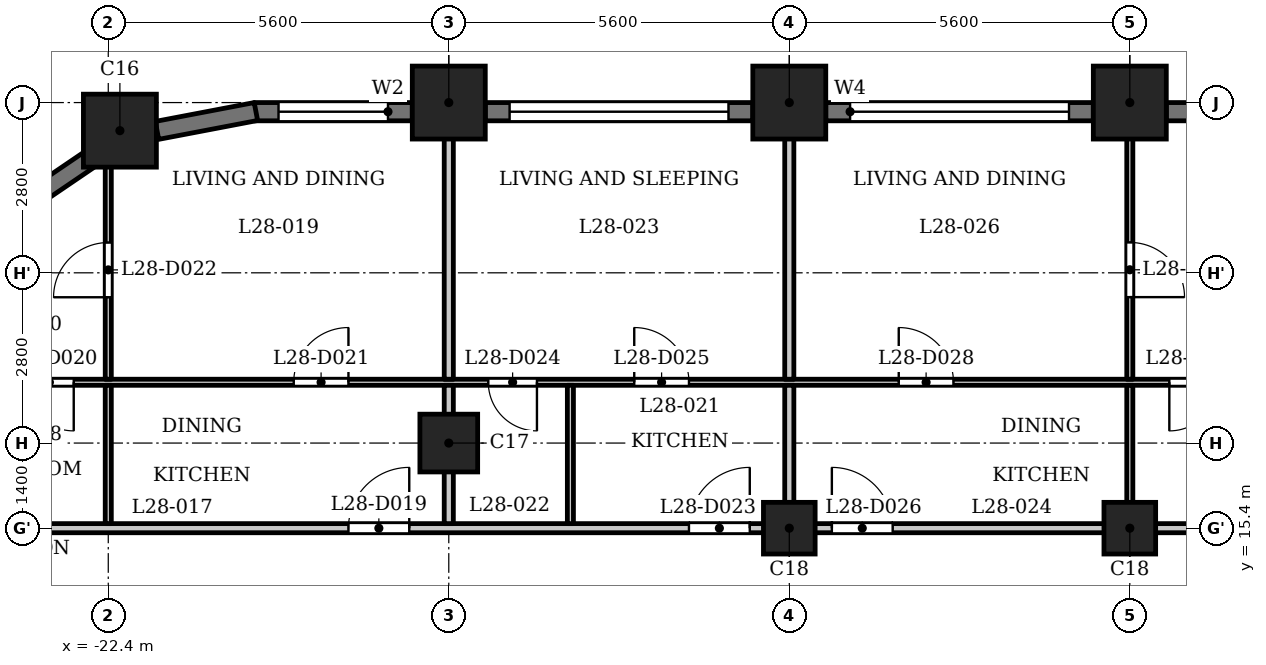
"""IFC4 building model, lengths in metres.
Left out: names, types, materials, properties, quantities, classifications, styles, units other than length and angle.
Written with IfcOpenShell. Run it as: python <this file> out.ifc"""

import sys

from ifc_helpers import new_model, si_unit, direction, frame, frame_2d, origin, origin_2d, place, context, subcontext, project, spatial, rectangle, extrude, element, fill, save


model = new_model("IFC4")
c1 = context("Model", 3, precision=1e-05, world=origin(), true_north=direction((0.0, 1.0)))
c2 = subcontext(c1, "Body", "Model", "MODEL_VIEW")
j1 = project(units=[si_unit("LENGTHUNIT", "METRE"), si_unit("PLANEANGLEUNIT", "RADIAN")], contexts=[c1])
p1 = place(None, origin())
s1 = spatial("IfcSite", under=j1, at=p1, CompositionType="ELEMENT")
p2 = place(p1, origin())
s2 = spatial("IfcBuilding", under=s1, at=p2, CompositionType="ELEMENT")
p3 = place(p2, frame((0.0, 0.0, 111.3)))
s3 = spatial("IfcBuildingStorey", under=s2, at=p3, CompositionType="ELEMENT", Elevation=111.3)
for number, where, z_axis, x_axis in (
    (1, (-5.6, 22.4, 0.0), (0.0, 0.0, 1.0), (1.0, 0.0, 0.0)),
    (2, (-11.2, 22.4, 0.0), (0.0, 0.0, 1.0), (1.0, 0.0, 0.0)),
    (3, (-16.8, 22.4, 0.0), (0.0, 0.0, 1.0), (1.0, 0.0, 0.0)),
    (4, (-22.209, 21.938, 0.0), (0.0, 0.0, 1.0), (1.0, 0.0, 0.0)),
):
    element("IfcColumn", number, at=place(p3, frame(where, z_axis=z_axis, x_axis=x_axis)), inside=s3, PredefinedType="COLUMN", context=c2, shape_type="SweptSolid", body=[
        extrude(rectangle(XDim=1.2, YDim=1.2, at=origin_2d()), origin(), (0.0, 0.0, 1.0), 3.5),
    ])
p4 = place(p3, frame((-16.8, 16.8, 0.0), z_axis=(0.0, 0.0, 1.0), x_axis=(1.0, 0.0, 0.0)))
e5 = element("IfcColumn", 5, at=p4, inside=s3, PredefinedType="COLUMN", context=c2, shape_type="SweptSolid", body=[
    extrude(rectangle(XDim=0.95, YDim=0.95, at=origin_2d()), origin(), (0.0, 0.0, 1.0), 3.5),
])
for number, where, z_axis, x_axis in (
    (6, (-11.2, 15.4, 0.0), (0.0, 0.0, 1.0), (1.0, 0.0, 0.0)),
    (7, (-5.6, 15.4, 0.0), (0.0, 0.0, 1.0), (1.0, 0.0, 0.0)),
):
    element("IfcColumn", number, at=place(p3, frame(where, z_axis=z_axis, x_axis=x_axis)), inside=s3, PredefinedType="COLUMN", context=c2, shape_type="SweptSolid", body=[
        extrude(rectangle(XDim=0.85, YDim=0.85, at=origin_2d()), origin(), (0.0, 0.0, 1.0), 3.5),
    ])
p5 = place(p3, frame((-0.6, 22.25, 0.0), z_axis=(0.0, 0.0, 1.0), x_axis=(-1.0, 0.0, 0.0)))
e8 = element("IfcWall", 8, at=p5, inside=s3, PredefinedType="SOLIDWALL", context=c2, shape_type="SweptSolid", body=[
    extrude(rectangle(XDim=4.4, YDim=0.3, at=frame_2d((2.2, 0.0))), origin(), (0.0, 0.0, 1.0), 2.4),
])
p6 = place(p5, frame((0.4, 0.0, 1.2)))
e9 = element("IfcOpeningElement", 9, at=p6, cuts=e8, PredefinedType="OPENING", context=c2, shape_type="SweptSolid", body=[
    extrude(rectangle(XDim=3.6, YDim=0.95, at=frame_2d((1.8, 0.475))), frame((0.0, 0.16, 0.0), z_axis=(0.0, -1.0, 0.0), x_axis=(1.0, 0.0, 0.0)), (0.0, 0.0, 1.0), 0.32),
])
p7 = place(p3, frame((-6.2, 22.25, 0.0), z_axis=(0.0, 0.0, 1.0), x_axis=(-1.0, 0.0, 0.0)))
e10 = element("IfcWall", 10, at=p7, inside=s3, PredefinedType="SOLIDWALL", context=c2, shape_type="SweptSolid", body=[
    extrude(rectangle(XDim=4.4, YDim=0.3, at=frame_2d((2.2, 0.0))), origin(), (0.0, 0.0, 1.0), 2.4),
])
p8 = place(p7, frame((0.4, 0.0, 1.2)))
e11 = element("IfcOpeningElement", 11, at=p8, cuts=e10, PredefinedType="OPENING", context=c2, shape_type="SweptSolid", body=[
    extrude(rectangle(XDim=3.6, YDim=0.95, at=frame_2d((1.8, 0.475))), frame((0.0, 0.16, 0.0), z_axis=(0.0, -1.0, 0.0), x_axis=(1.0, 0.0, 0.0)), (0.0, 0.0, 1.0), 0.32),
])
p9 = place(p3, frame((-11.8, 22.25, 0.0), z_axis=(0.0, 0.0, 1.0), x_axis=(-1.0, 0.0, 0.0)))
e12 = element("IfcWall", 12, at=p9, inside=s3, PredefinedType="SOLIDWALL", context=c2, shape_type="SweptSolid", body=[
    extrude(rectangle(XDim=4.4, YDim=0.3, at=frame_2d((2.2, 0.0))), origin(), (0.0, 0.0, 1.0), 2.4),
])
p10 = place(p9, frame((0.4, 0.0, 1.2)))
e13 = element("IfcOpeningElement", 13, at=p10, cuts=e12, PredefinedType="OPENING", context=c2, shape_type="SweptSolid", body=[
    extrude(rectangle(XDim=3.6, YDim=0.95, at=frame_2d((1.8, 0.475))), frame((0.0, 0.16, 0.0), z_axis=(0.0, -1.0, 0.0), x_axis=(1.0, 0.0, 0.0)), (0.0, 0.0, 1.0), 0.32),
])
p11 = place(p3, frame((-17.4, 22.25, 0.0), z_axis=(0.0, 0.0, 1.0), x_axis=(-1.0, 0.0, 0.0)))
e14 = element("IfcWall", 14, at=p11, inside=s3, PredefinedType="SOLIDWALL", context=c2, shape_type="SweptSolid", body=[
    extrude(rectangle(XDim=2.6, YDim=0.3, at=frame_2d((1.3, 0.0))), origin(), (0.0, 0.0, 1.0), 2.4),
])
p12 = place(p11, frame((0.4, 0.0, 0.9)))
e15 = element("IfcOpeningElement", 15, at=p12, cuts=e14, PredefinedType="OPENING", context=c2, shape_type="SweptSolid", body=[
    extrude(rectangle(XDim=1.8, YDim=1.25, at=frame_2d((0.9, 0.625))), frame((0.0, 0.16, 0.0), z_axis=(0.0, -1.0, 0.0), x_axis=(1.0, 0.0, 0.0)), (0.0, 0.0, 1.0), 0.32),
])
for number, where, z_axis, x_axis in (
    (16, (-19.972, 22.253, 0.0), (0.0, 0.0, 1.0), (-0.982, -0.187, 0.0)),
    (17, (-22.643, 21.51, 0.0), (0.0, 0.0, 1.0), (-0.827, -0.562, 0.0)),
):
    element("IfcWall", number, at=place(p3, frame(where, z_axis=z_axis, x_axis=x_axis)), inside=s3, PredefinedType="SOLIDWALL", context=c2, shape_type="SweptSolid", body=[
        extrude(rectangle(XDim=1.656, YDim=0.3, at=frame_2d((0.828, 0.0))), origin(), (0.0, 0.0, 1.0), 2.4),
    ])
p13 = place(p3, frame((-27.484, 15.4, 0.0), z_axis=(0.0, 0.0, 1.0), x_axis=(1.0, 0.0, 0.0)))
e18 = element("IfcWall", 18, at=p13, inside=s3, PredefinedType="PARTITIONING", context=c2, shape_type="SweptSolid", body=[
    extrude(rectangle(XDim=54.968, YDim=0.15, at=frame_2d((27.484, 0.0))), origin(), (0.0, 0.0, 1.0), 3.2),
])
p14 = place(p13, frame((9.034, 0.0, 0.0)))
e19 = element("IfcOpeningElement", 19, at=p14, cuts=e18, PredefinedType="OPENING", context=c2, shape_type="SweptSolid", body=[
    extrude(rectangle(XDim=1.0, YDim=2.1, at=frame_2d((0.5, 1.05))), frame((0.0, 0.085, 0.0), z_axis=(0.0, -1.0, 0.0), x_axis=(1.0, 0.0, 0.0)), (0.0, 0.0, 1.0), 0.17),
])
p15 = place(p13, frame((14.634, 0.0, 0.0)))
e20 = element("IfcOpeningElement", 20, at=p15, cuts=e18, PredefinedType="OPENING", context=c2, shape_type="SweptSolid", body=[
    extrude(rectangle(XDim=1.0, YDim=2.1, at=frame_2d((0.5, 1.05))), frame((0.0, 0.085, 0.0), z_axis=(0.0, -1.0, 0.0), x_axis=(1.0, 0.0, 0.0)), (0.0, 0.0, 1.0), 0.17),
])
p16 = place(p13, frame((16.984, 0.0, 0.0)))
e21 = element("IfcOpeningElement", 21, at=p16, cuts=e18, PredefinedType="OPENING", context=c2, shape_type="SweptSolid", body=[
    extrude(rectangle(XDim=1.0, YDim=2.1, at=frame_2d((0.5, 1.05))), frame((0.0, 0.085, 0.0), z_axis=(0.0, -1.0, 0.0), x_axis=(1.0, 0.0, 0.0)), (0.0, 0.0, 1.0), 0.17),
])
p17 = place(p13, frame((28.084, 0.0, 0.0)))
e22 = element("IfcOpeningElement", 22, at=p17, cuts=e18, PredefinedType="OPENING", context=c2, shape_type="SweptSolid", body=[
    extrude(rectangle(XDim=1.0, YDim=2.1, at=frame_2d((0.5, 1.05))), frame((0.0, 0.085, 0.0), z_axis=(0.0, -1.0, 0.0), x_axis=(1.0, 0.0, 0.0)), (0.0, 0.0, 1.0), 0.17),
])
p18 = place(p13, frame((34.834, 0.0, 0.0)))
e23 = element("IfcOpeningElement", 23, at=p18, cuts=e18, PredefinedType="OPENING", context=c2, shape_type="SweptSolid", body=[
    extrude(rectangle(XDim=1.0, YDim=2.1, at=frame_2d((0.5, 1.05))), frame((0.0, 0.085, 0.0), z_axis=(0.0, -1.0, 0.0), x_axis=(1.0, 0.0, 0.0)), (0.0, 0.0, 1.0), 0.17),
])
p19 = place(p13, frame((41.884, 0.0, 0.0)))
e24 = element("IfcOpeningElement", 24, at=p19, cuts=e18, PredefinedType="OPENING", context=c2, shape_type="SweptSolid", body=[
    extrude(rectangle(XDim=1.0, YDim=2.1, at=frame_2d((0.5, 1.05))), frame((0.0, 0.085, 0.0), z_axis=(0.0, -1.0, 0.0), x_axis=(1.0, 0.0, 0.0)), (0.0, 0.0, 1.0), 0.17),
])
p20 = place(p13, frame((48.234, 0.0, 0.0)))
e25 = element("IfcOpeningElement", 25, at=p20, cuts=e18, PredefinedType="OPENING", context=c2, shape_type="SweptSolid", body=[
    extrude(rectangle(XDim=1.0, YDim=2.1, at=frame_2d((0.5, 1.05))), frame((0.0, 0.085, 0.0), z_axis=(0.0, -1.0, 0.0), x_axis=(1.0, 0.0, 0.0)), (0.0, 0.0, 1.0), 0.17),
])
p21 = place(p3, frame((-26.465, 17.8, 0.0), z_axis=(0.0, 0.0, 1.0), x_axis=(1.0, 0.0, 0.0)))
e26 = element("IfcWall", 26, at=p21, inside=s3, PredefinedType="PARTITIONING", context=c2, shape_type="SweptSolid", body=[
    extrude(rectangle(XDim=52.859, YDim=0.1, at=frame_2d((26.43, 0.0))), origin(), (0.0, 0.0, 1.0), 3.2),
])
p22 = place(p21, frame((2.697, 0.0, 0.0)))
e27 = element("IfcOpeningElement", 27, at=p22, cuts=e26, PredefinedType="OPENING", context=c2, shape_type="SweptSolid", body=[
    extrude(rectangle(XDim=0.8, YDim=2.1, at=frame_2d((0.4, 1.05))), frame((0.0, 0.06, 0.0), z_axis=(0.0, -1.0, 0.0), x_axis=(1.0, 0.0, 0.0)), (0.0, 0.0, 1.0), 0.12),
])
p23 = place(p21, frame((7.115, 0.0, 0.0)))
e28 = element("IfcOpeningElement", 28, at=p23, cuts=e26, PredefinedType="OPENING", context=c2, shape_type="SweptSolid", body=[
    extrude(rectangle(XDim=0.9, YDim=2.1, at=frame_2d((0.45, 1.05))), frame((0.0, 0.06, 0.0), z_axis=(0.0, -1.0, 0.0), x_axis=(1.0, 0.0, 0.0)), (0.0, 0.0, 1.0), 0.12),
])
p24 = place(p21, frame((10.315, 0.0, 0.0)))
e29 = element("IfcOpeningElement", 29, at=p24, cuts=e26, PredefinedType="OPENING", context=c2, shape_type="SweptSolid", body=[
    extrude(rectangle(XDim=0.8, YDim=2.1, at=frame_2d((0.4, 1.05))), frame((0.0, 0.06, 0.0), z_axis=(0.0, -1.0, 0.0), x_axis=(1.0, 0.0, 0.0)), (0.0, 0.0, 1.0), 0.12),
])
p25 = place(p21, frame((12.715, 0.0, 0.0)))
e30 = element("IfcOpeningElement", 30, at=p25, cuts=e26, PredefinedType="OPENING", context=c2, shape_type="SweptSolid", body=[
    extrude(rectangle(XDim=0.9, YDim=2.1, at=frame_2d((0.45, 1.05))), frame((0.0, 0.06, 0.0), z_axis=(0.0, -1.0, 0.0), x_axis=(1.0, 0.0, 0.0)), (0.0, 0.0, 1.0), 0.12),
])
p26 = place(p21, frame((21.515, 0.0, 0.0)))
e31 = element("IfcOpeningElement", 31, at=p26, cuts=e26, PredefinedType="OPENING", context=c2, shape_type="SweptSolid", body=[
    extrude(rectangle(XDim=0.8, YDim=2.1, at=frame_2d((0.4, 1.05))), frame((0.0, 0.06, 0.0), z_axis=(0.0, -1.0, 0.0), x_axis=(1.0, 0.0, 0.0)), (0.0, 0.0, 1.0), 0.12),
])
p27 = place(p21, frame((17.065, 0.0, 0.0)))
e32 = element("IfcOpeningElement", 32, at=p27, cuts=e26, PredefinedType="OPENING", context=c2, shape_type="SweptSolid", body=[
    extrude(rectangle(XDim=0.9, YDim=2.1, at=frame_2d((0.45, 1.05))), frame((0.0, 0.06, 0.0), z_axis=(0.0, -1.0, 0.0), x_axis=(1.0, 0.0, 0.0)), (0.0, 0.0, 1.0), 0.12),
])
p28 = place(p21, frame((30.365, 0.0, 0.0)))
e33 = element("IfcOpeningElement", 33, at=p28, cuts=e26, PredefinedType="OPENING", context=c2, shape_type="SweptSolid", body=[
    extrude(rectangle(XDim=0.8, YDim=2.1, at=frame_2d((0.4, 1.05))), frame((0.0, 0.06, 0.0), z_axis=(0.0, -1.0, 0.0), x_axis=(1.0, 0.0, 0.0)), (0.0, 0.0, 1.0), 0.12),
])
p29 = place(p21, frame((28.165, 0.0, 0.0)))
e34 = element("IfcOpeningElement", 34, at=p29, cuts=e26, PredefinedType="OPENING", context=c2, shape_type="SweptSolid", body=[
    extrude(rectangle(XDim=0.9, YDim=2.1, at=frame_2d((0.45, 1.05))), frame((0.0, 0.06, 0.0), z_axis=(0.0, -1.0, 0.0), x_axis=(1.0, 0.0, 0.0)), (0.0, 0.0, 1.0), 0.12),
])
p30 = place(p21, frame((36.115, 0.0, 0.0)))
e35 = element("IfcOpeningElement", 35, at=p30, cuts=e26, PredefinedType="OPENING", context=c2, shape_type="SweptSolid", body=[
    extrude(rectangle(XDim=0.8, YDim=2.1, at=frame_2d((0.4, 1.05))), frame((0.0, 0.06, 0.0), z_axis=(0.0, -1.0, 0.0), x_axis=(1.0, 0.0, 0.0)), (0.0, 0.0, 1.0), 0.12),
])
p31 = place(p21, frame((32.915, 0.0, 0.0)))
e36 = element("IfcOpeningElement", 36, at=p31, cuts=e26, PredefinedType="OPENING", context=c2, shape_type="SweptSolid", body=[
    extrude(rectangle(XDim=0.9, YDim=2.1, at=frame_2d((0.45, 1.05))), frame((0.0, 0.06, 0.0), z_axis=(0.0, -1.0, 0.0), x_axis=(1.0, 0.0, 0.0)), (0.0, 0.0, 1.0), 0.12),
])
p32 = place(p21, frame((38.315, 0.0, 0.0)))
e37 = element("IfcOpeningElement", 37, at=p32, cuts=e26, PredefinedType="OPENING", context=c2, shape_type="SweptSolid", body=[
    extrude(rectangle(XDim=0.8, YDim=2.1, at=frame_2d((0.4, 1.05))), frame((0.0, 0.06, 0.0), z_axis=(0.0, -1.0, 0.0), x_axis=(1.0, 0.0, 0.0)), (0.0, 0.0, 1.0), 0.12),
])
p33 = place(p21, frame((40.965, 0.0, 0.0)))
e38 = element("IfcOpeningElement", 38, at=p33, cuts=e26, PredefinedType="OPENING", context=c2, shape_type="SweptSolid", body=[
    extrude(rectangle(XDim=0.9, YDim=2.1, at=frame_2d((0.45, 1.05))), frame((0.0, 0.06, 0.0), z_axis=(0.0, -1.0, 0.0), x_axis=(1.0, 0.0, 0.0)), (0.0, 0.0, 1.0), 0.12),
])
p34 = place(p21, frame((51.265, 0.0, 0.0)))
e39 = element("IfcOpeningElement", 39, at=p34, cuts=e26, PredefinedType="OPENING", context=c2, shape_type="SweptSolid", body=[
    extrude(rectangle(XDim=0.8, YDim=2.1, at=frame_2d((0.4, 1.05))), frame((0.0, 0.06, 0.0), z_axis=(0.0, -1.0, 0.0), x_axis=(1.0, 0.0, 0.0)), (0.0, 0.0, 1.0), 0.12),
])
p35 = place(p21, frame((46.315, 0.0, 0.0)))
e40 = element("IfcOpeningElement", 40, at=p35, cuts=e26, PredefinedType="OPENING", context=c2, shape_type="SweptSolid", body=[
    extrude(rectangle(XDim=0.9, YDim=2.1, at=frame_2d((0.45, 1.05))), frame((0.0, 0.06, 0.0), z_axis=(0.0, -1.0, 0.0), x_axis=(1.0, 0.0, 0.0)), (0.0, 0.0, 1.0), 0.12),
])
p36 = place(p3, frame((-22.4, 15.475, 0.0), z_axis=(0.0, 0.0, 1.0), x_axis=(0.0, 1.0, 0.0)))
e41 = element("IfcWall", 41, at=p36, inside=s3, PredefinedType="PARTITIONING", context=c2, shape_type="SweptSolid", body=[
    extrude(rectangle(XDim=2.275, YDim=0.1, at=frame_2d((1.137, 0.0))), origin(), (0.0, 0.0, 1.0), 3.2),
])
p37 = place(p3, frame((-22.4, 17.85, 0.0), z_axis=(0.0, 0.0, 1.0), x_axis=(0.0, 1.0, 0.0)))
e42 = element("IfcWall", 42, at=p37, inside=s3, PredefinedType="PARTITIONING", context=c2, shape_type="SweptSolid", body=[
    extrude(rectangle(XDim=3.87, YDim=0.1, at=frame_2d((1.935, 0.0))), origin(), (0.0, 0.0, 1.0), 3.2),
])
p38 = place(p37, frame((1.348, 0.0, 0.0)))
e43 = element("IfcOpeningElement", 43, at=p38, cuts=e42, PredefinedType="OPENING", context=c2, shape_type="SweptSolid", body=[
    extrude(rectangle(XDim=0.9, YDim=2.1, at=frame_2d((0.45, 1.05))), frame((0.0, 0.06, 0.0), z_axis=(0.0, -1.0, 0.0), x_axis=(1.0, 0.0, 0.0)), (0.0, 0.0, 1.0), 0.12),
])
p39 = place(p3, frame((-16.8, 15.475, 0.0), z_axis=(0.0, 0.0, 1.0), x_axis=(0.0, 1.0, 0.0)))
e44 = element("IfcWall", 44, at=p39, inside=s3, PredefinedType="PARTITIONING", context=c2, shape_type="SweptSolid", body=[
    extrude(rectangle(XDim=2.275, YDim=0.15, at=frame_2d((1.137, 0.0))), origin(), (0.0, 0.0, 1.0), 3.2),
])
p40 = place(p3, frame((-16.8, 17.85, 0.0), z_axis=(0.0, 0.0, 1.0), x_axis=(0.0, 1.0, 0.0)))
e45 = element("IfcWall", 45, at=p40, inside=s3, PredefinedType="PARTITIONING", context=c2, shape_type="SweptSolid", body=[
    extrude(rectangle(XDim=5.13, YDim=0.15, at=frame_2d((2.565, 0.0))), origin(), (0.0, 0.0, 1.0), 3.2),
])
p41 = place(p3, frame((-14.8, 15.475, 0.0), z_axis=(0.0, 0.0, 1.0), x_axis=(0.0, 1.0, 0.0)))
e46 = element("IfcWall", 46, at=p41, inside=s3, PredefinedType="PARTITIONING", context=c2, shape_type="SweptSolid", body=[
    extrude(rectangle(XDim=2.275, YDim=0.1, at=frame_2d((1.137, 0.0))), origin(), (0.0, 0.0, 1.0), 3.2),
])
p42 = place(p3, frame((-11.2, 15.475, 0.0), z_axis=(0.0, 0.0, 1.0), x_axis=(0.0, 1.0, 0.0)))
e47 = element("IfcWall", 47, at=p42, inside=s3, PredefinedType="PARTITIONING", context=c2, shape_type="SweptSolid", body=[
    extrude(rectangle(XDim=2.275, YDim=0.15, at=frame_2d((1.137, 0.0))), origin(), (0.0, 0.0, 1.0), 3.2),
])
p43 = place(p3, frame((-11.2, 17.85, 0.0), z_axis=(0.0, 0.0, 1.0), x_axis=(0.0, 1.0, 0.0)))
e48 = element("IfcWall", 48, at=p43, inside=s3, PredefinedType="PARTITIONING", context=c2, shape_type="SweptSolid", body=[
    extrude(rectangle(XDim=5.13, YDim=0.15, at=frame_2d((2.565, 0.0))), origin(), (0.0, 0.0, 1.0), 3.2),
])
p44 = place(p3, frame((-5.6, 15.475, 0.0), z_axis=(0.0, 0.0, 1.0), x_axis=(0.0, 1.0, 0.0)))
e49 = element("IfcWall", 49, at=p44, inside=s3, PredefinedType="PARTITIONING", context=c2, shape_type="SweptSolid", body=[
    extrude(rectangle(XDim=2.275, YDim=0.1, at=frame_2d((1.137, 0.0))), origin(), (0.0, 0.0, 1.0), 3.2),
])
p45 = place(p3, frame((-5.6, 17.85, 0.0), z_axis=(0.0, 0.0, 1.0), x_axis=(0.0, 1.0, 0.0)))
e50 = element("IfcWall", 50, at=p45, inside=s3, PredefinedType="PARTITIONING", context=c2, shape_type="SweptSolid", body=[
    extrude(rectangle(XDim=5.13, YDim=0.1, at=frame_2d((2.565, 0.0))), origin(), (0.0, 0.0, 1.0), 3.2),
])
p46 = place(p45, frame((1.35, 0.0, 0.0)))
e51 = element("IfcOpeningElement", 51, at=p46, cuts=e50, PredefinedType="OPENING", context=c2, shape_type="SweptSolid", body=[
    extrude(rectangle(XDim=0.9, YDim=2.1, at=frame_2d((0.45, 1.05))), frame((0.0, 0.06, 0.0), z_axis=(0.0, -1.0, 0.0), x_axis=(1.0, 0.0, 0.0)), (0.0, 0.0, 1.0), 0.12),
])
p47 = place(p14, origin())
e52 = element("IfcDoor", 52, at=p47, inside=s3, OperationType="SINGLE_SWING_LEFT", PredefinedType="DOOR", context=c2, shape_type="SweptSolid", body=[
    extrude(rectangle(XDim=1.0, YDim=2.1, at=frame_2d((0.5, 1.05))), frame((0.0, 0.025, 0.0), z_axis=(0.0, -1.0, 0.0), x_axis=(1.0, 0.0, 0.0)), (0.0, 0.0, 1.0), 0.05),
])
fill(e19, e52)
p48 = place(p22, origin())
e53 = element("IfcDoor", 53, at=p48, inside=s3, OperationType="SINGLE_SWING_RIGHT", PredefinedType="DOOR", context=c2, shape_type="SweptSolid", body=[
    extrude(rectangle(XDim=0.8, YDim=2.1, at=frame_2d((0.4, 1.05))), frame((0.0, 0.025, 0.0), z_axis=(0.0, -1.0, 0.0), x_axis=(1.0, 0.0, 0.0)), (0.0, 0.0, 1.0), 0.05),
])
fill(e27, e53)
p49 = place(p23, origin())
e54 = element("IfcDoor", 54, at=p49, inside=s3, OperationType="SINGLE_SWING_LEFT", PredefinedType="DOOR", context=c2, shape_type="SweptSolid", body=[
    extrude(rectangle(XDim=0.9, YDim=2.1, at=frame_2d((0.45, 1.05))), frame((0.0, 0.025, 0.0), z_axis=(0.0, -1.0, 0.0), x_axis=(1.0, 0.0, 0.0)), (0.0, 0.0, 1.0), 0.05),
])
fill(e28, e54)
p50 = place(p38, origin())
e55 = element("IfcDoor", 55, at=p50, inside=s3, OperationType="SINGLE_SWING_RIGHT", PredefinedType="DOOR", context=c2, shape_type="SweptSolid", body=[
    extrude(rectangle(XDim=0.9, YDim=2.1, at=frame_2d((0.45, 1.05))), frame((0.0, 0.025, 0.0), z_axis=(0.0, -1.0, 0.0), x_axis=(1.0, 0.0, 0.0)), (0.0, 0.0, 1.0), 0.05),
])
fill(e43, e55)
p51 = place(p15, origin())
e56 = element("IfcDoor", 56, at=p51, inside=s3, OperationType="SINGLE_SWING_LEFT", PredefinedType="DOOR", context=c2, shape_type="SweptSolid", body=[
    extrude(rectangle(XDim=1.0, YDim=2.1, at=frame_2d((0.5, 1.05))), frame((0.0, 0.025, 0.0), z_axis=(0.0, -1.0, 0.0), x_axis=(1.0, 0.0, 0.0)), (0.0, 0.0, 1.0), 0.05),
])
fill(e20, e56)
p52 = place(p24, origin())
e57 = element("IfcDoor", 57, at=p52, inside=s3, OperationType="SINGLE_SWING_RIGHT", PredefinedType="DOOR", context=c2, shape_type="SweptSolid", body=[
    extrude(rectangle(XDim=0.8, YDim=2.1, at=frame_2d((0.4, 1.05))), frame((0.0, 0.025, 0.0), z_axis=(0.0, -1.0, 0.0), x_axis=(1.0, 0.0, 0.0)), (0.0, 0.0, 1.0), 0.05),
])
fill(e29, e57)
p53 = place(p25, origin())
e58 = element("IfcDoor", 58, at=p53, inside=s3, OperationType="SINGLE_SWING_RIGHT", PredefinedType="DOOR", context=c2, shape_type="SweptSolid", body=[
    extrude(rectangle(XDim=0.9, YDim=2.1, at=frame_2d((0.45, 1.05))), frame((0.0, 0.025, 0.0), z_axis=(0.0, -1.0, 0.0), x_axis=(1.0, 0.0, 0.0)), (0.0, 0.0, 1.0), 0.05),
])
fill(e30, e58)
p54 = place(p16, origin())
e59 = element("IfcDoor", 59, at=p54, inside=s3, OperationType="SINGLE_SWING_RIGHT", PredefinedType="DOOR", context=c2, shape_type="SweptSolid", body=[
    extrude(rectangle(XDim=1.0, YDim=2.1, at=frame_2d((0.5, 1.05))), frame((0.0, 0.025, 0.0), z_axis=(0.0, -1.0, 0.0), x_axis=(1.0, 0.0, 0.0)), (0.0, 0.0, 1.0), 0.05),
])
fill(e21, e59)
p55 = place(p26, origin())
e60 = element("IfcDoor", 60, at=p55, inside=s3, OperationType="SINGLE_SWING_LEFT", PredefinedType="DOOR", context=c2, shape_type="SweptSolid", body=[
    extrude(rectangle(XDim=0.8, YDim=2.1, at=frame_2d((0.4, 1.05))), frame((0.0, 0.025, 0.0), z_axis=(0.0, -1.0, 0.0), x_axis=(1.0, 0.0, 0.0)), (0.0, 0.0, 1.0), 0.05),
])
fill(e31, e60)
p56 = place(p27, origin())
e61 = element("IfcDoor", 61, at=p56, inside=s3, OperationType="SINGLE_SWING_RIGHT", PredefinedType="DOOR", context=c2, shape_type="SweptSolid", body=[
    extrude(rectangle(XDim=0.9, YDim=2.1, at=frame_2d((0.45, 1.05))), frame((0.0, 0.025, 0.0), z_axis=(0.0, -1.0, 0.0), x_axis=(1.0, 0.0, 0.0)), (0.0, 0.0, 1.0), 0.05),
])
fill(e32, e61)
p57 = place(p46, origin())
e62 = element("IfcDoor", 62, at=p57, inside=s3, OperationType="SINGLE_SWING_LEFT", PredefinedType="DOOR", context=c2, shape_type="SweptSolid", body=[
    extrude(rectangle(XDim=0.9, YDim=2.1, at=frame_2d((0.45, 1.05))), frame((0.0, 0.025, 0.0), z_axis=(0.0, -1.0, 0.0), x_axis=(1.0, 0.0, 0.0)), (0.0, 0.0, 1.0), 0.05),
])
fill(e51, e62)
p58 = place(p8, origin())
e63 = element("IfcWindow", 63, at=p58, inside=s3, PartitioningType="SINGLE_PANEL", PredefinedType="WINDOW", context=c2, shape_type="SweptSolid", body=[
    extrude(rectangle(XDim=3.6, YDim=0.95, at=frame_2d((1.8, 0.475))), frame((0.0, 0.03, 0.0), z_axis=(0.0, -1.0, 0.0), x_axis=(1.0, 0.0, 0.0)), (0.0, 0.0, 1.0), 0.06),
])
fill(e11, e63)
p59 = place(p10, origin())
e64 = element("IfcWindow", 64, at=p59, inside=s3, PartitioningType="SINGLE_PANEL", PredefinedType="WINDOW", context=c2, shape_type="SweptSolid", body=[
    extrude(rectangle(XDim=3.6, YDim=0.95, at=frame_2d((1.8, 0.475))), frame((0.0, 0.03, 0.0), z_axis=(0.0, -1.0, 0.0), x_axis=(1.0, 0.0, 0.0)), (0.0, 0.0, 1.0), 0.06),
])
fill(e13, e64)
p60 = place(p12, origin())
e65 = element("IfcWindow", 65, at=p60, inside=s3, PartitioningType="SINGLE_PANEL", PredefinedType="WINDOW", context=c2, shape_type="SweptSolid", body=[
    extrude(rectangle(XDim=1.8, YDim=1.25, at=frame_2d((0.9, 0.625))), frame((0.0, 0.03, 0.0), z_axis=(0.0, -1.0, 0.0), x_axis=(1.0, 0.0, 0.0)), (0.0, 0.0, 1.0), 0.06),
])
fill(e15, e65)
save(model, sys.argv[1])
